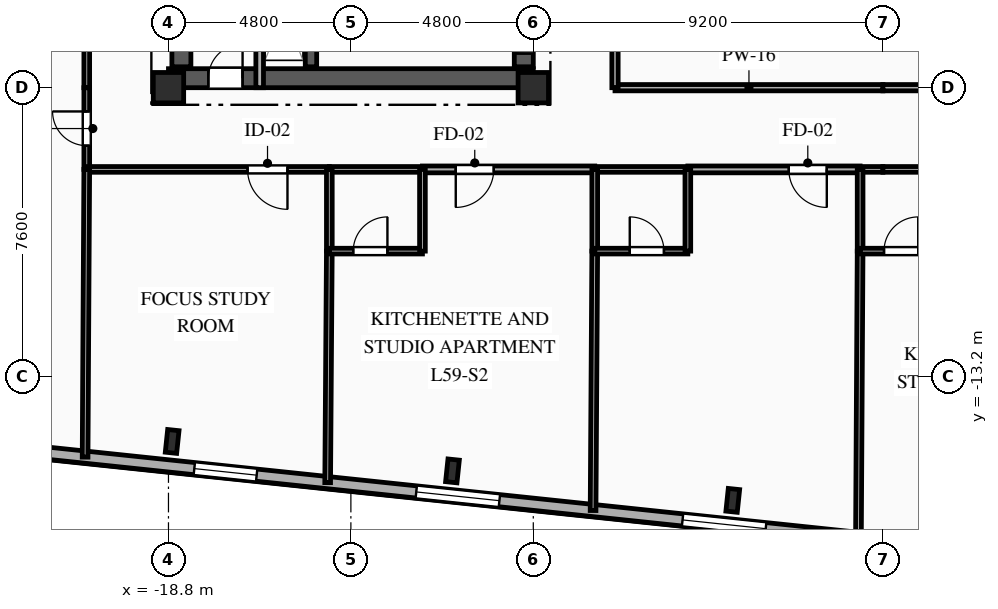
"""IFC4 building model, lengths in metres.
Left out: names, types, materials, properties, quantities, classifications, styles, units other than length and angle.
Written with IfcOpenShell. Run it as: python <this file> out.ifc"""

import sys

from ifc_helpers import new_model, si_unit, direction, frame, frame_2d, origin, origin_2d, place, context, subcontext, project, spatial, rectangle, i_section, extrude, element, fill, save


model = new_model("IFC4")
c1 = context("Model", 3, precision=1e-05, world=origin(), true_north=direction((0.0, 1.0)))
c2 = subcontext(c1, "Body", "Model", "MODEL_VIEW")
j1 = project(units=[si_unit("LENGTHUNIT", "METRE"), si_unit("PLANEANGLEUNIT", "RADIAN")], contexts=[c1])
p1 = place(None, origin())
s1 = spatial("IfcSite", under=j1, at=p1, CompositionType="ELEMENT")
p2 = place(p1, origin())
s2 = spatial("IfcBuilding", under=s1, at=p2, CompositionType="ELEMENT")
p3 = place(p2, frame((0.0, 0.0, 209.8)))
s3 = spatial("IfcBuildingStorey", under=s2, at=p3, CompositionType="ELEMENT", Elevation=209.8)
for number, where, z_axis, x_axis in (
    (1, (-18.8, -5.6, 0.0), (0.0, 0.0, 1.0), (1.0, 0.0, 0.0)),
    (2, (-9.2, -5.6, 0.0), (0.0, 0.0, 1.0), (1.0, 0.0, 0.0)),
):
    element("IfcColumn", number, at=place(p3, frame(where, z_axis=z_axis, x_axis=x_axis)), inside=s3, PredefinedType="COLUMN", context=c2, shape_type="SweptSolid", body=[
        extrude(rectangle(XDim=0.8, YDim=0.8, at=origin_2d()), origin(), (0.0, 0.0, 1.0), 3.35),
    ])
for number, where, z_axis, x_axis in (
    (3, (-18.703, -14.908, 0.0), (0.0, 0.0, 1.0), (0.995, -0.105, 0.0)),
    (4, (-11.327, -15.683, 0.0), (0.0, 0.0, 1.0), (0.995, -0.105, 0.0)),
    (5, (-3.951, -16.458, 0.0), (0.0, 0.0, 1.0), (0.995, -0.105, 0.0)),
):
    element("IfcColumn", number, at=place(p3, frame(where, z_axis=z_axis, x_axis=x_axis)), inside=s3, PredefinedType="COLUMN", context=c2, shape_type="SweptSolid", body=[
        extrude(i_section(OverallWidth=0.3, OverallDepth=0.6, WebThickness=0.015, FlangeThickness=0.03, FilletRadius=0.027, at=origin_2d()), origin(), (0.0, 0.0, 1.0), 3.35),
    ])
p4 = place(p3, frame((18.756, -19.498, 0.0), z_axis=(0.0, 0.0, 1.0), x_axis=(-0.994522060044, 0.104526896475, 0.0)))
e6 = element("IfcWall", 6, at=p4, inside=s3, PredefinedType="SOLIDWALL", context=c2, shape_type="SweptSolid", body=[
    extrude(rectangle(XDim=45.8, YDim=0.32, at=frame_2d((22.9, 0.0))), origin(), (0.0, 0.0, 1.0), 3.04),
])
p5 = place(p4, frame((2.778, 0.0, 0.85)))
e7 = element("IfcOpeningElement", 7, at=p5, cuts=e6, PredefinedType="OPENING", context=c2, shape_type="SweptSolid", body=[
    extrude(rectangle(XDim=1.65, YDim=1.85, at=frame_2d((0.825, 0.925))), frame((0.0, 0.17, 0.0), z_axis=(0.0, -1.0, 0.0), x_axis=(1.0, 0.0, 0.0)), (0.0, 0.0, 1.0), 0.34),
])
p6 = place(p4, frame((7.948, 0.0, 0.85)))
e8 = element("IfcOpeningElement", 8, at=p6, cuts=e6, PredefinedType="OPENING", context=c2, shape_type="SweptSolid", body=[
    extrude(rectangle(XDim=2.2, YDim=1.85, at=frame_2d((1.1, 0.925))), frame((0.0, 0.17, 0.0), z_axis=(0.0, -1.0, 0.0), x_axis=(1.0, 0.0, 0.0)), (0.0, 0.0, 1.0), 0.34),
])
p7 = place(p4, frame((14.954, 0.0, 0.85)))
e9 = element("IfcOpeningElement", 9, at=p7, cuts=e6, PredefinedType="OPENING", context=c2, shape_type="SweptSolid", body=[
    extrude(rectangle(XDim=2.2, YDim=1.85, at=frame_2d((1.1, 0.925))), frame((0.0, 0.17, 0.0), z_axis=(0.0, -1.0, 0.0), x_axis=(1.0, 0.0, 0.0)), (0.0, 0.0, 1.0), 0.34),
])
p8 = place(p4, frame((21.96, 0.0, 0.85)))
e10 = element("IfcOpeningElement", 10, at=p8, cuts=e6, PredefinedType="OPENING", context=c2, shape_type="SweptSolid", body=[
    extrude(rectangle(XDim=2.2, YDim=1.85, at=frame_2d((1.1, 0.925))), frame((0.0, 0.17, 0.0), z_axis=(0.0, -1.0, 0.0), x_axis=(1.0, 0.0, 0.0)), (0.0, 0.0, 1.0), 0.34),
])
p9 = place(p4, frame((29.006, 0.0, 0.85)))
e11 = element("IfcOpeningElement", 11, at=p9, cuts=e6, PredefinedType="OPENING", context=c2, shape_type="SweptSolid", body=[
    extrude(rectangle(XDim=2.2, YDim=1.85, at=frame_2d((1.1, 0.925))), frame((0.0, 0.17, 0.0), z_axis=(0.0, -1.0, 0.0), x_axis=(1.0, 0.0, 0.0)), (0.0, 0.0, 1.0), 0.34),
])
p10 = place(p4, frame((35.429, 0.0, 0.85)))
e12 = element("IfcOpeningElement", 12, at=p10, cuts=e6, PredefinedType="OPENING", context=c2, shape_type="SweptSolid", body=[
    extrude(rectangle(XDim=1.65, YDim=1.85, at=frame_2d((0.825, 0.925))), frame((0.0, 0.17, 0.0), z_axis=(0.0, -1.0, 0.0), x_axis=(1.0, 0.0, 0.0)), (0.0, 0.0, 1.0), 0.34),
])
p11 = place(p4, frame((41.212, 0.0, 0.85)))
e13 = element("IfcOpeningElement", 13, at=p11, cuts=e6, PredefinedType="OPENING", context=c2, shape_type="SweptSolid", body=[
    extrude(rectangle(XDim=1.65, YDim=1.85, at=frame_2d((0.825, 0.925))), frame((0.0, 0.17, 0.0), z_axis=(0.0, -1.0, 0.0), x_axis=(1.0, 0.0, 0.0)), (0.0, 0.0, 1.0), 0.34),
])
p12 = place(p3, frame((-18.8, -5.35, 0.0), z_axis=(0.0, 0.0, 1.0), x_axis=(1.0, 0.0, 0.0)))
e14 = element("IfcWall", 14, at=p12, inside=s3, PredefinedType="SHEAR", context=c2, shape_type="SweptSolid", body=[
    extrude(rectangle(XDim=9.6, YDim=0.5, at=frame_2d((4.8, 0.0))), origin(), (0.0, 0.0, 1.0), 3.04),
])
p13 = place(p12, frame((1.05, 0.0, 0.0)))
e15 = element("IfcOpeningElement", 15, at=p13, cuts=e14, PredefinedType="OPENING", context=c2, shape_type="SweptSolid", body=[
    extrude(rectangle(XDim=0.9, YDim=2.1, at=frame_2d((0.45, 1.05))), frame((0.0, 0.26, 0.0), z_axis=(0.0, -1.0, 0.0), x_axis=(1.0, 0.0, 0.0)), (0.0, 0.0, 1.0), 0.52),
])
p14 = place(p3, frame((-18.46, -5.05, 0.0), z_axis=(0.0, 0.0, 1.0), x_axis=(0.0, 1.0, 0.0)))
e16 = element("IfcWall", 16, at=p14, inside=s3, PredefinedType="SHEAR", context=c2, shape_type="SweptSolid", body=[
    extrude(rectangle(XDim=10.1, YDim=0.5, at=frame_2d((5.05, 0.0))), origin(), (0.0, 0.0, 1.0), 3.04),
])
p15 = place(p3, frame((-9.45, -5.05, 0.0), z_axis=(0.0, 0.0, 1.0), x_axis=(0.0, 1.0, 0.0)))
e17 = element("IfcWall", 17, at=p15, inside=s3, PredefinedType="SHEAR", context=c2, shape_type="SweptSolid", body=[
    extrude(rectangle(XDim=10.1, YDim=0.5, at=frame_2d((5.05, 0.0))), origin(), (0.0, 0.0, 1.0), 3.04),
])
p16 = place(p15, frame((7.175, 0.0, 0.0)))
e18 = element("IfcOpeningElement", 18, at=p16, cuts=e17, PredefinedType="OPENING", context=c2, shape_type="SweptSolid", body=[
    extrude(rectangle(XDim=0.9, YDim=2.1, at=frame_2d((0.45, 1.05))), frame((0.0, 0.26, 0.0), z_axis=(0.0, -1.0, 0.0), x_axis=(1.0, 0.0, 0.0)), (0.0, 0.0, 1.0), 0.52),
])
p17 = place(p15, frame((2.4, 0.0, 0.0)))
e19 = element("IfcOpeningElement", 19, at=p17, cuts=e17, PredefinedType="OPENING", context=c2, shape_type="SweptSolid", body=[
    extrude(rectangle(XDim=1.2, YDim=2.15, at=frame_2d((0.6, 1.075))), frame((0.0, 0.26, 0.0), z_axis=(0.0, -1.0, 0.0), x_axis=(1.0, 0.0, 0.0)), (0.0, 0.0, 1.0), 0.52),
])
p18 = place(p15, frame((0.35, 0.0, 0.0)))
e20 = element("IfcOpeningElement", 20, at=p18, cuts=e17, PredefinedType="OPENING", context=c2, shape_type="SweptSolid", body=[
    extrude(rectangle(XDim=0.9, YDim=2.1, at=frame_2d((0.45, 1.05))), frame((0.0, 0.26, 0.0), z_axis=(0.0, -1.0, 0.0), x_axis=(1.0, 0.0, 0.0)), (0.0, 0.0, 1.0), 0.52),
])
p19 = place(p15, frame((5.0, 0.0, 0.0)))
e21 = element("IfcOpeningElement", 21, at=p19, cuts=e17, PredefinedType="OPENING", context=c2, shape_type="SweptSolid", body=[
    extrude(rectangle(XDim=0.9, YDim=2.1, at=frame_2d((0.45, 1.05))), frame((0.0, 0.26, 0.0), z_axis=(0.0, -1.0, 0.0), x_axis=(1.0, 0.0, 0.0)), (0.0, 0.0, 1.0), 0.52),
])
p20 = place(p3, frame((-15.05, -5.05, 0.0), z_axis=(0.0, 0.0, 1.0), x_axis=(0.0, 1.0, 0.0)))
e22 = element("IfcWall", 22, at=p20, inside=s3, PredefinedType="SHEAR", context=c2, shape_type="SweptSolid", body=[
    extrude(rectangle(XDim=10.1, YDim=0.3, at=frame_2d((5.05, 0.0))), origin(), (0.0, 0.0, 1.0), 3.04),
])
p21 = place(p3, frame((-16.4, -5.6, 0.0), z_axis=(0.0, 0.0, 1.0), x_axis=(0.0, 1.0, 0.0)))
e23 = element("IfcWall", 23, at=p21, inside=s3, PredefinedType="PARTITIONING", context=c2, shape_type="SweptSolid", body=[
    extrude(rectangle(XDim=3.49, YDim=0.2, at=frame_2d((1.745, 0.0))), origin(), (0.0, 0.0, 1.0), 3.04),
])
p22 = place(p3, frame((-20.95, -7.75, 0.0), z_axis=(0.0, 0.0, 1.0), x_axis=(0.0, 1.0, 0.0)))
e24 = element("IfcWall", 24, at=p22, inside=s3, PredefinedType="PARTITIONING", context=c2, shape_type="SweptSolid", body=[
    extrude(rectangle(XDim=2.15, YDim=0.15, at=frame_2d((1.075, 0.0))), origin(), (0.0, 0.0, 1.0), 3.04),
])
p23 = place(p22, frame((0.625, 0.0, 0.0)))
e25 = element("IfcOpeningElement", 25, at=p23, cuts=e24, PredefinedType="OPENING", context=c2, shape_type="SweptSolid", body=[
    extrude(rectangle(XDim=0.9, YDim=2.1, at=frame_2d((0.45, 1.05))), frame((0.0, 0.085, 0.0), z_axis=(0.0, -1.0, 0.0), x_axis=(1.0, 0.0, 0.0)), (0.0, 0.0, 1.0), 0.17),
])
p24 = place(p3, frame((-14.567, -7.75, 0.0), z_axis=(0.0, 0.0, 1.0), x_axis=(-1.0, 0.0, 0.0)))
e26 = element("IfcWall", 26, at=p24, inside=s3, PredefinedType="PARTITIONING", context=c2, shape_type="SweptSolid", body=[
    extrude(rectangle(XDim=6.383, YDim=0.15, at=frame_2d((3.191, 0.0))), origin(), (0.0, 0.0, 1.0), 3.04),
])
p25 = place(p24, frame((1.102, 0.0, 0.0)))
e27 = element("IfcOpeningElement", 27, at=p25, cuts=e26, PredefinedType="OPENING", context=c2, shape_type="SweptSolid", body=[
    extrude(rectangle(XDim=1.05, YDim=2.15, at=frame_2d((0.525, 1.075))), frame((0.0, 0.085, 0.0), z_axis=(0.0, -1.0, 0.0), x_axis=(1.0, 0.0, 0.0)), (0.0, 0.0, 1.0), 0.17),
])
p26 = place(p3, frame((-7.583, -7.75, 0.0), z_axis=(0.0, 0.0, 1.0), x_axis=(-1.0, 0.0, 0.0)))
e28 = element("IfcWall", 28, at=p26, inside=s3, PredefinedType="PARTITIONING", context=c2, shape_type="SweptSolid", body=[
    extrude(rectangle(XDim=4.534, YDim=0.18, at=frame_2d((2.267, 0.0))), origin(), (0.0, 0.0, 1.0), 3.04),
])
p27 = place(p26, frame((2.657, 0.0, 0.0)))
e29 = element("IfcOpeningElement", 29, at=p27, cuts=e28, PredefinedType="OPENING", context=c2, shape_type="SweptSolid", body=[
    extrude(rectangle(XDim=1.0, YDim=2.15, at=frame_2d((0.5, 1.075))), frame((0.0, 0.1, 0.0), z_axis=(0.0, -1.0, 0.0), x_axis=(1.0, 0.0, 0.0)), (0.0, 0.0, 1.0), 0.2),
])
p28 = place(p3, frame((-12.117, -7.75, 0.0), z_axis=(0.0, 0.0, 1.0), x_axis=(-1.0, 0.0, 0.0)))
e30 = element("IfcWall", 30, at=p28, inside=s3, PredefinedType="PLUMBINGWALL", context=c2, shape_type="SweptSolid", body=[
    extrude(rectangle(XDim=2.45, YDim=0.15, at=frame_2d((1.225, 0.0))), origin(), (0.0, 0.0, 1.0), 3.04),
])
p29 = place(p3, frame((-0.6, -7.75, 0.0), z_axis=(0.0, 0.0, 1.0), x_axis=(-1.0, 0.0, 0.0)))
e31 = element("IfcWall", 31, at=p29, inside=s3, PredefinedType="PARTITIONING", context=c2, shape_type="SweptSolid", body=[
    extrude(rectangle(XDim=4.533, YDim=0.18, at=frame_2d((2.267, 0.0))), origin(), (0.0, 0.0, 1.0), 3.04),
])
p30 = place(p29, frame((0.877, 0.0, 0.0)))
e32 = element("IfcOpeningElement", 32, at=p30, cuts=e31, PredefinedType="OPENING", context=c2, shape_type="SweptSolid", body=[
    extrude(rectangle(XDim=1.0, YDim=2.15, at=frame_2d((0.5, 1.075))), frame((0.0, 0.1, 0.0), z_axis=(0.0, -1.0, 0.0), x_axis=(1.0, 0.0, 0.0)), (0.0, 0.0, 1.0), 0.2),
])
p31 = place(p3, frame((-5.133, -7.75, 0.0), z_axis=(0.0, 0.0, 1.0), x_axis=(-1.0, 0.0, 0.0)))
e33 = element("IfcWall", 33, at=p31, inside=s3, PredefinedType="PLUMBINGWALL", context=c2, shape_type="SweptSolid", body=[
    extrude(rectangle(XDim=2.45, YDim=0.15, at=frame_2d((1.225, 0.0))), origin(), (0.0, 0.0, 1.0), 3.04),
])
p32 = place(p3, frame((0.0, -7.75, 0.0), z_axis=(0.0, 0.0, 1.0), x_axis=(-1.0, 0.0, 0.0)))
e34 = element("IfcWall", 34, at=p32, inside=s3, PredefinedType="PLUMBINGWALL", context=c2, shape_type="SweptSolid", body=[
    extrude(rectangle(XDim=0.6, YDim=0.15, at=frame_2d((0.3, 0.0))), origin(), (0.0, 0.0, 1.0), 3.04),
])
p33 = place(p3, frame((-7.05, -5.6, 0.0), z_axis=(0.0, 0.0, 1.0), x_axis=(1.0, 0.0, 0.0)))
e35 = element("IfcWall", 35, at=p33, inside=s3, PredefinedType="PARTITIONING", context=c2, shape_type="SweptSolid", body=[
    extrude(rectangle(XDim=7.05, YDim=0.165, at=frame_2d((3.525, 0.0))), origin(), (0.0, 0.0, 1.0), 2.525),
])
p34 = place(p3, frame((1.85, -7.75, 0.0), z_axis=(0.0, 0.0, 1.0), x_axis=(-1.0, 0.0, 0.0)))
e36 = element("IfcWall", 36, at=p34, inside=s3, PredefinedType="PLUMBINGWALL", context=c2, shape_type="SweptSolid", body=[
    extrude(rectangle(XDim=1.85, YDim=0.15, at=frame_2d((0.925, 0.0))), origin(), (0.0, 0.0, 1.0), 3.04),
])
p35 = place(p3, frame((0.0, -5.6, 0.0), z_axis=(0.0, 0.0, 1.0), x_axis=(1.0, 0.0, 0.0)))
e37 = element("IfcWall", 37, at=p35, inside=s3, PredefinedType="PARTITIONING", context=c2, shape_type="SweptSolid", body=[
    extrude(rectangle(XDim=7.05, YDim=0.165, at=frame_2d((3.525, 0.0))), origin(), (0.0, 0.0, 1.0), 2.525),
])
p36 = place(p3, frame((-20.95, -5.6, 0.0), z_axis=(0.0, 0.0, 1.0), x_axis=(0.0, 1.0, 0.0)))
e38 = element("IfcWall", 38, at=p36, inside=s3, PredefinedType="PARTITIONING", context=c2, shape_type="SweptSolid", body=[
    extrude(rectangle(XDim=2.144, YDim=0.15, at=frame_2d((1.072, 0.0))), origin(), (0.0, 0.0, 1.0), 3.04),
])
p37 = place(p3, frame((-7.05, -2.95, 0.0), z_axis=(0.0, 0.0, 1.0), x_axis=(0.0, -1.0, 0.0)))
e39 = element("IfcWall", 39, at=p37, inside=s3, PredefinedType="PARTITIONING", context=c2, shape_type="SweptSolid", body=[
    extrude(rectangle(XDim=2.65, YDim=0.165, at=frame_2d((1.325, 0.0))), origin(), (0.0, 0.0, 1.0), 3.04),
])
p38 = place(p3, frame((-20.95, -7.75, 0.0), z_axis=(0.0, 0.0, 1.0), x_axis=(-0.005804668564, -0.99998315277, 0.0)))
e40 = element("IfcWall", 40, at=p38, inside=s3, PredefinedType="PARTITIONING", context=c2, shape_type="SweptSolid", body=[
    extrude(rectangle(XDim=7.571, YDim=0.15, at=frame_2d((3.785, 0.0))), origin(), (0.0, 0.0, 1.0), 3.04),
])
p39 = place(p3, frame((-14.567, -9.9, 0.0), z_axis=(0.0, 0.0, 1.0), x_axis=(-0.007213951996, -0.99997397911, 0.0)))
e41 = element("IfcWall", 41, at=p39, inside=s3, PredefinedType="PARTITIONING", context=c2, shape_type="SweptSolid", body=[
    extrude(rectangle(XDim=6.092, YDim=0.15, at=frame_2d((3.046, 0.0))), origin(), (0.0, 0.0, 1.0), 3.04),
])
p40 = place(p3, frame((-14.567, -7.75, 0.0), z_axis=(0.0, 0.0, 1.0), x_axis=(0.0, -1.0, 0.0)))
e42 = element("IfcWall", 42, at=p40, inside=s3, PredefinedType="PLUMBINGWALL", context=c2, shape_type="SweptSolid", body=[
    extrude(rectangle(XDim=2.15, YDim=0.15, at=frame_2d((1.075, 0.0))), origin(), (0.0, 0.0, 1.0), 3.04),
])
p41 = place(p3, frame((-14.567, -9.9, 0.0), z_axis=(0.0, 0.0, 1.0), x_axis=(1.0, 0.0, 0.0)))
e43 = element("IfcWall", 43, at=p41, inside=s3, PredefinedType="PLUMBINGWALL", context=c2, shape_type="SweptSolid", body=[
    extrude(rectangle(XDim=2.45, YDim=0.15, at=frame_2d((1.225, 0.0))), origin(), (0.0, 0.0, 1.0), 3.04),
])
p42 = place(p41, frame((0.629, 0.0, 0.0)))
e44 = element("IfcOpeningElement", 44, at=p42, cuts=e43, PredefinedType="OPENING", context=c2, shape_type="SweptSolid", body=[
    extrude(rectangle(XDim=0.9, YDim=2.1, at=frame_2d((0.45, 1.05))), frame((0.0, 0.085, 0.0), z_axis=(0.0, -1.0, 0.0), x_axis=(1.0, 0.0, 0.0)), (0.0, 0.0, 1.0), 0.17),
])
p43 = place(p3, frame((-12.117, -9.9, 0.0), z_axis=(0.0, 0.0, 1.0), x_axis=(0.0, 1.0, 0.0)))
e45 = element("IfcWall", 45, at=p43, inside=s3, PredefinedType="PLUMBINGWALL", context=c2, shape_type="SweptSolid", body=[
    extrude(rectangle(XDim=2.15, YDim=0.15, at=frame_2d((1.075, 0.0))), origin(), (0.0, 0.0, 1.0), 3.04),
])
p44 = place(p3, frame((-7.583, -9.9, 0.0), z_axis=(0.0, 0.0, 1.0), x_axis=(-0.006438095341, -0.999979275249, 0.0)))
e46 = element("IfcWall", 46, at=p44, inside=s3, PredefinedType="PARTITIONING", context=c2, shape_type="SweptSolid", body=[
    extrude(rectangle(XDim=6.826, YDim=0.15, at=frame_2d((3.413, 0.0))), origin(), (0.0, 0.0, 1.0), 3.04),
])
p45 = place(p3, frame((-7.583, -7.75, 0.0), z_axis=(0.0, 0.0, 1.0), x_axis=(0.0, -1.0, 0.0)))
e47 = element("IfcWall", 47, at=p45, inside=s3, PredefinedType="PLUMBINGWALL", context=c2, shape_type="SweptSolid", body=[
    extrude(rectangle(XDim=2.15, YDim=0.15, at=frame_2d((1.075, 0.0))), origin(), (0.0, 0.0, 1.0), 3.04),
])
p46 = place(p3, frame((-7.583, -9.9, 0.0), z_axis=(0.0, 0.0, 1.0), x_axis=(1.0, 0.0, 0.0)))
e48 = element("IfcWall", 48, at=p46, inside=s3, PredefinedType="PLUMBINGWALL", context=c2, shape_type="SweptSolid", body=[
    extrude(rectangle(XDim=2.45, YDim=0.15, at=frame_2d((1.225, 0.0))), origin(), (0.0, 0.0, 1.0), 3.04),
])
p47 = place(p46, frame((0.921, 0.0, 0.0)))
e49 = element("IfcOpeningElement", 49, at=p47, cuts=e48, PredefinedType="OPENING", context=c2, shape_type="SweptSolid", body=[
    extrude(rectangle(XDim=0.9, YDim=2.1, at=frame_2d((0.45, 1.05))), frame((0.0, 0.085, 0.0), z_axis=(0.0, -1.0, 0.0), x_axis=(1.0, 0.0, 0.0)), (0.0, 0.0, 1.0), 0.17),
])
p48 = place(p3, frame((-5.133, -9.9, 0.0), z_axis=(0.0, 0.0, 1.0), x_axis=(0.0, 1.0, 0.0)))
e50 = element("IfcWall", 50, at=p48, inside=s3, PredefinedType="PLUMBINGWALL", context=c2, shape_type="SweptSolid", body=[
    extrude(rectangle(XDim=2.15, YDim=0.15, at=frame_2d((1.075, 0.0))), origin(), (0.0, 0.0, 1.0), 3.04),
])
p49 = place(p3, frame((-0.6, -9.9, 0.0), z_axis=(0.0, 0.0, 1.0), x_axis=(-0.005780810266, -0.999983290977, 0.0)))
e51 = element("IfcWall", 51, at=p49, inside=s3, PredefinedType="PARTITIONING", context=c2, shape_type="SweptSolid", body=[
    extrude(rectangle(XDim=7.56, YDim=0.15, at=frame_2d((3.78, 0.0))), origin(), (0.0, 0.0, 1.0), 3.04),
])
p50 = place(p3, frame((-0.6, -7.75, 0.0), z_axis=(0.0, 0.0, 1.0), x_axis=(0.0, -1.0, 0.0)))
e52 = element("IfcWall", 52, at=p50, inside=s3, PredefinedType="PLUMBINGWALL", context=c2, shape_type="SweptSolid", body=[
    extrude(rectangle(XDim=2.15, YDim=0.15, at=frame_2d((1.075, 0.0))), origin(), (0.0, 0.0, 1.0), 3.04),
])
p51 = place(p3, frame((-0.6, -9.9, 0.0), z_axis=(0.0, 0.0, 1.0), x_axis=(1.0, 0.0, 0.0)))
e53 = element("IfcWall", 53, at=p51, inside=s3, PredefinedType="PLUMBINGWALL", context=c2, shape_type="SweptSolid", body=[
    extrude(rectangle(XDim=2.45, YDim=0.15, at=frame_2d((1.225, 0.0))), origin(), (0.0, 0.0, 1.0), 3.04),
])
p52 = place(p51, frame((0.629, 0.0, 0.0)))
e54 = element("IfcOpeningElement", 54, at=p52, cuts=e53, PredefinedType="OPENING", context=c2, shape_type="SweptSolid", body=[
    extrude(rectangle(XDim=0.9, YDim=2.1, at=frame_2d((0.45, 1.05))), frame((0.0, 0.085, 0.0), z_axis=(0.0, -1.0, 0.0), x_axis=(1.0, 0.0, 0.0)), (0.0, 0.0, 1.0), 0.17),
])
p53 = place(p8, origin())
e55 = element("IfcWindow", 55, at=p53, inside=s3, PartitioningType="SINGLE_PANEL", PredefinedType="WINDOW", context=c2, shape_type="SweptSolid", body=[
    extrude(rectangle(XDim=2.2, YDim=1.85, at=frame_2d((1.1, 0.925))), frame((0.0, 0.03, 0.0), z_axis=(0.0, -1.0, 0.0), x_axis=(1.0, 0.0, 0.0)), (0.0, 0.0, 1.0), 0.06),
])
fill(e10, e55)
p54 = place(p9, origin())
e56 = element("IfcWindow", 56, at=p54, inside=s3, PartitioningType="SINGLE_PANEL", PredefinedType="WINDOW", context=c2, shape_type="SweptSolid", body=[
    extrude(rectangle(XDim=2.2, YDim=1.85, at=frame_2d((1.1, 0.925))), frame((0.0, 0.03, 0.0), z_axis=(0.0, -1.0, 0.0), x_axis=(1.0, 0.0, 0.0)), (0.0, 0.0, 1.0), 0.06),
])
fill(e11, e56)
p55 = place(p10, origin())
e57 = element("IfcWindow", 57, at=p55, inside=s3, PartitioningType="SINGLE_PANEL", PredefinedType="WINDOW", context=c2, shape_type="SweptSolid", body=[
    extrude(rectangle(XDim=1.65, YDim=1.85, at=frame_2d((0.825, 0.925))), frame((0.0, 0.03, 0.0), z_axis=(0.0, -1.0, 0.0), x_axis=(1.0, 0.0, 0.0)), (0.0, 0.0, 1.0), 0.06),
])
fill(e12, e57)
p56 = place(p13, origin())
e58 = element("IfcDoor", 58, at=p56, inside=s3, OperationType="SINGLE_SWING_RIGHT", PredefinedType="DOOR", context=c2, shape_type="SweptSolid", body=[
    extrude(rectangle(XDim=0.9, YDim=2.1, at=frame_2d((0.45, 1.05))), frame((0.0, 0.025, 0.0), z_axis=(0.0, -1.0, 0.0), x_axis=(1.0, 0.0, 0.0)), (0.0, 0.0, 1.0), 0.05),
])
fill(e15, e58)
p57 = place(p18, origin())
e59 = element("IfcDoor", 59, at=p57, inside=s3, OperationType="SINGLE_SWING_RIGHT", PredefinedType="DOOR", context=c2, shape_type="SweptSolid", body=[
    extrude(rectangle(XDim=0.9, YDim=2.1, at=frame_2d((0.45, 1.05))), frame((0.0, 0.025, 0.0), z_axis=(0.0, -1.0, 0.0), x_axis=(1.0, 0.0, 0.0)), (0.0, 0.0, 1.0), 0.05),
])
fill(e20, e59)
p58 = place(p23, origin())
e60 = element("IfcDoor", 60, at=p58, inside=s3, OperationType="SINGLE_SWING_RIGHT", PredefinedType="DOOR", context=c2, shape_type="SweptSolid", body=[
    extrude(rectangle(XDim=0.9, YDim=2.1, at=frame_2d((0.45, 1.05))), frame((0.0, 0.025, 0.0), z_axis=(0.0, -1.0, 0.0), x_axis=(1.0, 0.0, 0.0)), (0.0, 0.0, 1.0), 0.05),
])
fill(e25, e60)
p59 = place(p25, origin())
e61 = element("IfcDoor", 61, at=p59, inside=s3, OperationType="SINGLE_SWING_LEFT", PredefinedType="DOOR", context=c2, shape_type="SweptSolid", body=[
    extrude(rectangle(XDim=1.05, YDim=2.15, at=frame_2d((0.525, 1.075))), frame((0.0, 0.025, 0.0), z_axis=(0.0, -1.0, 0.0), x_axis=(1.0, 0.0, 0.0)), (0.0, 0.0, 1.0), 0.05),
])
fill(e27, e61)
p60 = place(p27, origin())
e62 = element("IfcDoor", 62, at=p60, inside=s3, OperationType="SINGLE_SWING_RIGHT", PredefinedType="DOOR", context=c2, shape_type="SweptSolid", body=[
    extrude(rectangle(XDim=1.0, YDim=2.15, at=frame_2d((0.5, 1.075))), frame((0.0, 0.025, 0.0), z_axis=(0.0, -1.0, 0.0), x_axis=(1.0, 0.0, 0.0)), (0.0, 0.0, 1.0), 0.05),
])
fill(e29, e62)
p61 = place(p30, origin())
e63 = element("IfcDoor", 63, at=p61, inside=s3, OperationType="SINGLE_SWING_LEFT", PredefinedType="DOOR", context=c2, shape_type="SweptSolid", body=[
    extrude(rectangle(XDim=1.0, YDim=2.15, at=frame_2d((0.5, 1.075))), frame((0.0, 0.025, 0.0), z_axis=(0.0, -1.0, 0.0), x_axis=(1.0, 0.0, 0.0)), (0.0, 0.0, 1.0), 0.05),
])
fill(e32, e63)
p62 = place(p42, origin())
e64 = element("IfcDoor", 64, at=p62, inside=s3, OperationType="SINGLE_SWING_RIGHT", PredefinedType="DOOR", context=c2, shape_type="SweptSolid", body=[
    extrude(rectangle(XDim=0.9, YDim=2.1, at=frame_2d((0.45, 1.05))), frame((0.0, 0.025, 0.0), z_axis=(0.0, -1.0, 0.0), x_axis=(1.0, 0.0, 0.0)), (0.0, 0.0, 1.0), 0.05),
])
fill(e44, e64)
p63 = place(p47, origin())
e65 = element("IfcDoor", 65, at=p63, inside=s3, OperationType="SINGLE_SWING_LEFT", PredefinedType="DOOR", context=c2, shape_type="SweptSolid", body=[
    extrude(rectangle(XDim=0.9, YDim=2.1, at=frame_2d((0.45, 1.05))), frame((0.0, 0.025, 0.0), z_axis=(0.0, -1.0, 0.0), x_axis=(1.0, 0.0, 0.0)), (0.0, 0.0, 1.0), 0.05),
])
fill(e49, e65)
p64 = place(p52, origin())
e66 = element("IfcDoor", 66, at=p64, inside=s3, OperationType="SINGLE_SWING_RIGHT", PredefinedType="DOOR", context=c2, shape_type="SweptSolid", body=[
    extrude(rectangle(XDim=0.9, YDim=2.1, at=frame_2d((0.45, 1.05))), frame((0.0, 0.025, 0.0), z_axis=(0.0, -1.0, 0.0), x_axis=(1.0, 0.0, 0.0)), (0.0, 0.0, 1.0), 0.05),
])
fill(e54, e66)
save(model, sys.argv[1])
